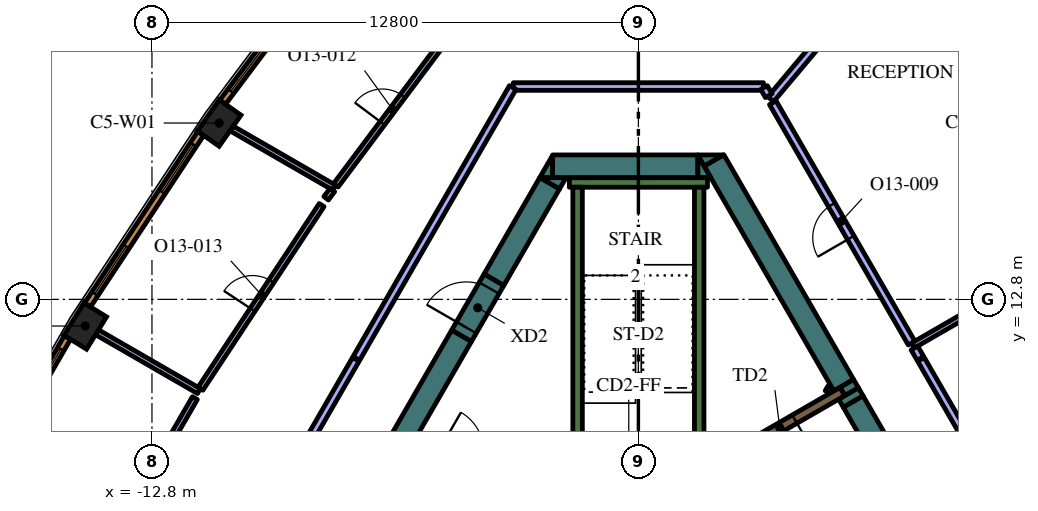
"""IFC4 building model, lengths in metres.
Left out: names, types, materials, properties, quantities, classifications, styles, units other than length and angle.
Written with IfcOpenShell. Run it as: python <this file> out.ifc"""

import sys

from ifc_helpers import new_model, si_unit, direction, frame, frame_2d, origin, origin_2d, place, context, subcontext, project, spatial, polyline, rectangle, outline, extrude, element, fill, save


model = new_model("IFC4")
c1 = context("Model", 3, precision=1e-05, world=origin(), true_north=direction((0.0, 1.0)))
c2 = subcontext(c1, "Body", "Model", "MODEL_VIEW")
j1 = project(units=[si_unit("LENGTHUNIT", "METRE"), si_unit("PLANEANGLEUNIT", "RADIAN")], contexts=[c1])
p1 = place(None, origin())
s1 = spatial("IfcSite", under=j1, at=p1, CompositionType="ELEMENT")
p2 = place(p1, origin())
s2 = spatial("IfcBuilding", under=s1, at=p2, CompositionType="ELEMENT")
p3 = place(p2, frame((0.0, 0.0, 300.6)))
s3 = spatial("IfcBuildingStorey", under=s2, at=p3, CompositionType="ELEMENT", Elevation=300.6)
for number, where, z_axis, x_axis in (
    (1, (-11.032, 17.44, 0.0), (0.0, 0.0, 1.0), (-0.575, -0.818, 0.0)),
    (2, (-14.556, 12.098, 0.0), (0.0, 0.0, 1.0), (-0.526, -0.851, 0.0)),
):
    element("IfcColumn", number, at=place(p3, frame(where, z_axis=z_axis, x_axis=x_axis)), inside=s3, PredefinedType="COLUMN", context=c2, shape_type="SweptSolid", body=[
        extrude(rectangle(XDim=1.0, YDim=0.7, at=origin_2d()), origin(), (0.0, 0.0, 1.0), 4.2),
    ])
p4 = place(p3, frame((5.529, 10.324, 0.0), z_axis=(0.0, 0.0, 1.0), x_axis=(0.499122205112, -0.866531606097, 0.0)))
e3 = element("IfcWall", 3, at=p4, inside=s3, PredefinedType="SOLIDWALL", context=c2, shape_type="SweptSolid", body=[
    extrude(rectangle(XDim=0.247, YDim=0.6, at=frame_2d((0.123, 0.0))), origin(), (0.0, 0.0, 1.0), 4.2),
])
p5 = place(p3, frame((1.989, 16.456, 0.0), z_axis=(0.0, 0.0, 1.0), x_axis=(0.499973159588, -0.866040899549, 0.0)))
e4 = element("IfcWall", 4, at=p5, inside=s3, PredefinedType="SOLIDWALL", context=c2, shape_type="SweptSolid", body=[
    extrude(rectangle(XDim=6.828, YDim=0.6, at=frame_2d((3.414, 0.0))), origin(), (0.0, 0.0, 1.0), 4.2),
])
p6 = place(p3, origin())
e5 = element("IfcWall", 5, at=p6, inside=s3, PredefinedType="SOLIDWALL", context=c2, shape_type="SweptSolid", body=[
    extrude(outline(polyline([(5.664, 10.691), (5.788, 10.476), (5.432, 10.271), (5.308, 10.486), (5.664, 10.691)])), origin(), (0.0, 0.0, 1.0), 4.2),
])
e6 = element("IfcWall", 6, at=p6, inside=s3, PredefinedType="SOLIDWALL", context=c2, shape_type="SweptSolid", body=[
    extrude(outline(polyline([(1.559, 16.6), (2.235, 16.6), (1.728, 16.307), (1.559, 16.6)])), origin(), (0.0, 0.0, 1.0), 4.2),
])
p7 = place(p3, frame((8.192, 5.711, 0.0), z_axis=(0.0, 0.0, 1.0), x_axis=(-0.500006836656, 0.866021456604, 0.0)))
e7 = element("IfcWall", 7, at=p7, inside=s3, PredefinedType="SOLIDWALL", context=c2, shape_type="SweptSolid", body=[
    extrude(rectangle(XDim=5.078, YDim=0.6, at=frame_2d((2.539, 0.0))), origin(), (0.0, 0.0, 1.0), 4.2),
])
p8 = place(p3, frame((-2.258, 16.3, 0.0), z_axis=(0.0, 0.0, 1.0), x_axis=(1.0, 0.0, 0.0)))
e8 = element("IfcWall", 8, at=p8, inside=s3, PredefinedType="SOLIDWALL", context=c2, shape_type="SweptSolid", body=[
    extrude(rectangle(XDim=3.823, YDim=0.6, at=frame_2d((1.912, 0.0))), origin(), (0.0, 0.0, 1.0), 4.2),
])
e9 = element("IfcWall", 9, at=p6, inside=s3, PredefinedType="SOLIDWALL", context=c2, shape_type="SweptSolid", body=[
    extrude(outline(polyline([(1.905, 16.0), (1.567, 16.0), (1.567, 16.585), (1.905, 16.0)])), origin(), (0.0, 0.0, 1.0), 4.2),
])
e10 = element("IfcWall", 10, at=p6, inside=s3, PredefinedType="SOLIDWALL", context=c2, shape_type="SweptSolid", body=[
    extrude(outline(polyline([(-2.598, 16.0), (-2.26, 16.585), (-2.26, 16.0), (-2.598, 16.0)])), origin(), (0.0, 0.0, 1.0), 4.2),
])
p9 = place(p3, frame((-2.335, 15.855, 0.0), z_axis=(0.0, 0.0, 1.0), x_axis=(-0.499960127962, -0.866048422692, 0.0)))
e11 = element("IfcWall", 11, at=p9, inside=s3, PredefinedType="SOLIDWALL", context=c2, shape_type="SweptSolid", body=[
    extrude(rectangle(XDim=2.934, YDim=0.6, at=frame_2d((1.467, 0.0))), origin(), (0.0, 0.0, 1.0), 4.2),
])
e12 = element("IfcWall", 12, at=p6, inside=s3, PredefinedType="SOLIDWALL", context=c2, shape_type="SweptSolid", body=[
    extrude(outline(polyline([(-1.905, 16.0), (-2.074, 15.707), (-2.581, 16.0), (-1.905, 16.0)])), origin(), (0.0, 0.0, 1.0), 4.2),
])
p10 = place(p3, frame((-12.582, -1.892, 0.0), z_axis=(0.0, 0.0, 1.0), x_axis=(0.500003640647, 0.866023301845, 0.0)))
e13 = element("IfcWall", 13, at=p10, inside=s3, PredefinedType="SOLIDWALL", context=c2, shape_type="SweptSolid", body=[
    extrude(rectangle(XDim=15.858, YDim=0.6, at=frame_2d((7.929, 0.0))), origin(), (0.0, 0.0, 1.0), 4.2),
])
p11 = place(p3, frame((-1.817, 15.875, 0.0), z_axis=(0.0, 0.0, 1.0), x_axis=(1.0, 0.0, 0.0)))
e14 = element("IfcWall", 14, at=p11, inside=s3, PredefinedType="SOLIDWALL", context=c2, shape_type="SweptSolid", body=[
    extrude(rectangle(XDim=3.634, YDim=0.25, at=frame_2d((1.817, 0.0))), origin(), (0.0, 0.0, 1.0), 4.2),
])
p12 = place(p3, frame((1.6, 8.95, 0.0), z_axis=(0.0, 0.0, 1.0), x_axis=(0.0, 1.0, 0.0)))
e15 = element("IfcWall", 15, at=p12, inside=s3, PredefinedType="SOLIDWALL", context=c2, shape_type="SweptSolid", body=[
    extrude(rectangle(XDim=6.8, YDim=0.25, at=frame_2d((3.4, 0.0))), origin(), (0.0, 0.0, 1.0), 4.2),
])
p13 = place(p3, frame((-1.6, 8.7, 0.0), z_axis=(0.0, 0.0, 1.0), x_axis=(0.0, 1.0, 0.0)))
e16 = element("IfcWall", 16, at=p13, inside=s3, PredefinedType="SOLIDWALL", context=c2, shape_type="SweptSolid", body=[
    extrude(rectangle(XDim=7.05, YDim=0.25, at=frame_2d((3.525, 0.0))), origin(), (0.0, 0.0, 1.0), 4.2),
])
p14 = place(p3, frame((4.98, 10.358, 0.0), z_axis=(0.0, 0.0, 1.0), x_axis=(0.500640202437, 0.86565546709, 0.0)))
e17 = element("IfcWall", 17, at=p14, inside=s3, PredefinedType="PARTITIONING", context=c2, shape_type="SweptSolid", body=[
    extrude(rectangle(XDim=0.146, YDim=0.15, at=frame_2d((0.073, 0.0))), origin(), (0.0, 0.0, 1.0), 3.55),
])
p15 = place(p3, frame((5.366, 10.373, 0.0), z_axis=(0.0, 0.0, 1.0), x_axis=(-0.866019956843, -0.50000943426, 0.0)))
e18 = element("IfcWall", 18, at=p15, inside=s3, PredefinedType="SOLIDWALL", context=c2, shape_type="SweptSolid", body=[
    extrude(rectangle(XDim=2.7, YDim=0.25, at=frame_2d((1.35, 0.0))), origin(), (0.0, 0.0, 1.0), 4.2),
])
p16 = place(p15, frame((1.45, 0.0, 0.0)))
e19 = element("IfcOpeningElement", 19, at=p16, cuts=e18, PredefinedType="OPENING", context=c2, shape_type="SweptSolid", body=[
    extrude(rectangle(XDim=0.9, YDim=2.1, at=frame_2d((0.45, 1.05))), frame((0.0, 0.135, 0.0), z_axis=(0.0, -1.0, 0.0), x_axis=(1.0, 0.0, 0.0)), (0.0, 0.0, 1.0), 0.27),
])
p17 = place(p3, frame((-4.652, 11.842, 0.0), z_axis=(0.0, 0.0, 1.0), x_axis=(0.500062241894, 0.865989465428, 0.0)))
e20 = element("IfcWall", 20, at=p17, inside=s3, PredefinedType="SOLIDWALL", context=c2, shape_type="SweptSolid", body=[
    extrude(rectangle(XDim=1.7, YDim=0.6, at=frame_2d((0.85, 0.0))), origin(), (0.0, 0.0, 1.0), 4.2),
])
p18 = place(p17, frame((0.25, 0.0, 0.0)))
e21 = element("IfcOpeningElement", 21, at=p18, cuts=e20, PredefinedType="OPENING", context=c2, shape_type="SweptSolid", body=[
    extrude(rectangle(XDim=1.2, YDim=2.1, at=frame_2d((0.6, 1.05))), frame((0.0, 0.31, 0.0), z_axis=(0.0, -1.0, 0.0), x_axis=(1.0, 0.0, 0.0)), (0.0, 0.0, 1.0), 0.62),
])
p19 = place(p3, frame((7.226, 11.585, 0.0), z_axis=(0.0, 0.0, 1.0), x_axis=(0.866021079084, 0.500007490527, 0.0)))
e22 = element("IfcWall", 22, at=p19, inside=s3, PredefinedType="PARTITIONING", context=c2, shape_type="SweptSolid", body=[
    extrude(rectangle(XDim=2.892, YDim=0.15, at=frame_2d((1.446, 0.0))), origin(), (0.0, 0.0, 1.0), 3.55),
])
p20 = place(p3, frame((13.436, 0.829, 0.0), z_axis=(0.0, 0.0, 1.0), x_axis=(-0.49999894854, 0.866026010844, 0.0)))
e23 = element("IfcWall", 23, at=p20, inside=s3, PredefinedType="PARTITIONING", context=c2, shape_type="SweptSolid", body=[
    extrude(rectangle(XDim=12.0, YDim=0.2, at=frame_2d((6.0, 0.0))), origin(), (0.0, 0.0, 1.0), 3.55),
])
p21 = place(p20, frame((5.5, 0.0, 0.0)))
e24 = element("IfcOpeningElement", 24, at=p21, cuts=e23, PredefinedType="OPENING", context=c2, shape_type="SweptSolid", body=[
    extrude(rectangle(XDim=1.0, YDim=2.1, at=frame_2d((0.5, 1.05))), frame((0.0, 0.11, 0.0), z_axis=(0.0, -1.0, 0.0), x_axis=(1.0, 0.0, 0.0)), (0.0, 0.0, 1.0), 0.22),
])
p22 = place(p3, frame((7.421, 11.247, 0.0), z_axis=(0.0, 0.0, 1.0), x_axis=(-0.500303403544, 0.865850162789, 0.0)))
e25 = element("IfcWall", 25, at=p22, inside=s3, PredefinedType="PARTITIONING", context=c2, shape_type="SweptSolid", body=[
    extrude(rectangle(XDim=0.315, YDim=0.2, at=frame_2d((0.158, 0.0))), origin(), (0.0, 0.0, 1.0), 3.55),
])
p23 = place(p3, frame((3.483, 18.067, 0.0), z_axis=(0.0, 0.0, 1.0), x_axis=(0.642896944312, 0.765952687177, 0.0)))
e26 = element("IfcWall", 26, at=p23, inside=s3, PredefinedType="PARTITIONING", context=c2, shape_type="SweptSolid", body=[
    extrude(rectangle(XDim=2.29, YDim=0.2, at=frame_2d((1.145, 0.0))), origin(), (0.0, 0.0, 1.0), 3.55),
])
p24 = place(p3, frame((7.188, 11.65, 0.0), z_axis=(0.0, 0.0, 1.0), x_axis=(-0.499989634868, 0.866031388014, 0.0)))
e27 = element("IfcWall", 27, at=p24, inside=s3, PredefinedType="PARTITIONING", context=c2, shape_type="SweptSolid", body=[
    extrude(rectangle(XDim=7.303, YDim=0.2, at=frame_2d((3.652, 0.0))), origin(), (0.0, 0.0, 1.0), 3.55),
])
p25 = place(p24, frame((3.2, 0.0, 0.0)))
e28 = element("IfcOpeningElement", 28, at=p25, cuts=e27, PredefinedType="OPENING", context=c2, shape_type="SweptSolid", body=[
    extrude(rectangle(XDim=1.0, YDim=2.1, at=frame_2d((0.5, 1.05))), frame((0.0, 0.11, 0.0), z_axis=(0.0, -1.0, 0.0), x_axis=(1.0, 0.0, 0.0)), (0.0, 0.0, 1.0), 0.22),
])
p26 = place(p3, frame((-8.007, 15.74, 0.0), z_axis=(0.0, 0.0, 1.0), x_axis=(-0.866044607523, 0.499966736674, 0.0)))
e29 = element("IfcWall", 29, at=p26, inside=s3, PredefinedType="PARTITIONING", context=c2, shape_type="SweptSolid", body=[
    extrude(rectangle(XDim=3.115, YDim=0.15, at=frame_2d((1.557, 0.0))), origin(), (0.0, 0.0, 1.0), 3.55),
])
p27 = place(p3, frame((-7.962, 15.8, 0.0), z_axis=(0.0, 0.0, 1.0), x_axis=(0.599541489613, 0.800343677574, 0.0)))
e30 = element("IfcWall", 30, at=p27, inside=s3, PredefinedType="PARTITIONING", context=c2, shape_type="SweptSolid", body=[
    extrude(rectangle(XDim=4.942, YDim=0.15, at=frame_2d((2.471, 0.0))), origin(), (0.0, 0.0, 1.0), 3.55),
])
p28 = place(p27, frame((2.042, 0.0, 0.0)))
e31 = element("IfcOpeningElement", 31, at=p28, cuts=e30, PredefinedType="OPENING", context=c2, shape_type="SweptSolid", body=[
    extrude(rectangle(XDim=0.9, YDim=2.1, at=frame_2d((0.45, 1.05))), frame((0.0, 0.085, 0.0), z_axis=(0.0, -1.0, 0.0), x_axis=(1.0, 0.0, 0.0)), (0.0, 0.0, 1.0), 0.17),
])
p29 = place(p3, frame((-11.564, 10.387, 0.0), z_axis=(0.0, 0.0, 1.0), x_axis=(-0.86604641216, 0.499963610661, 0.0)))
e32 = element("IfcWall", 32, at=p29, inside=s3, PredefinedType="PARTITIONING", context=c2, shape_type="SweptSolid", body=[
    extrude(rectangle(XDim=3.096, YDim=0.15, at=frame_2d((1.548, 0.0))), origin(), (0.0, 0.0, 1.0), 3.55),
])
p30 = place(p3, frame((-8.052, 15.679, 0.0), z_axis=(0.0, 0.0, 1.0), x_axis=(-0.599004157744, -0.800745914136, 0.0)))
e33 = element("IfcWall", 33, at=p30, inside=s3, PredefinedType="PARTITIONING", context=c2, shape_type="SweptSolid", body=[
    extrude(rectangle(XDim=0.275, YDim=0.15, at=frame_2d((0.137, 0.0))), origin(), (0.0, 0.0, 1.0), 3.55),
])
p31 = place(p3, frame((-11.523, 10.449, 0.0), z_axis=(0.0, 0.0, 1.0), x_axis=(0.550751709023, 0.834669129061, 0.0)))
e34 = element("IfcWall", 34, at=p31, inside=s3, PredefinedType="PARTITIONING", context=c2, shape_type="SweptSolid", body=[
    extrude(rectangle(XDim=5.788, YDim=0.15, at=frame_2d((2.894, 0.0))), origin(), (0.0, 0.0, 1.0), 3.55),
])
p32 = place(p31, frame((2.488, 0.0, 0.0)))
e35 = element("IfcOpeningElement", 35, at=p32, cuts=e34, PredefinedType="OPENING", context=c2, shape_type="SweptSolid", body=[
    extrude(rectangle(XDim=0.9, YDim=2.1, at=frame_2d((0.45, 1.05))), frame((0.0, 0.085, 0.0), z_axis=(0.0, -1.0, 0.0), x_axis=(1.0, 0.0, 0.0)), (0.0, 0.0, 1.0), 0.17),
])
p33 = place(p3, frame((-14.74, 4.887, 0.0), z_axis=(0.0, 0.0, 1.0), x_axis=(0.500007141444, 0.86602128063, 0.0)))
e36 = element("IfcWall", 36, at=p33, inside=s3, PredefinedType="PARTITIONING", context=c2, shape_type="SweptSolid", body=[
    extrude(rectangle(XDim=6.137, YDim=0.15, at=frame_2d((3.068, 0.0))), origin(), (0.0, 0.0, 1.0), 3.55),
])
p34 = place(p33, frame((2.637, 0.0, 0.0)))
e37 = element("IfcOpeningElement", 37, at=p34, cuts=e36, PredefinedType="OPENING", context=c2, shape_type="SweptSolid", body=[
    extrude(rectangle(XDim=0.9, YDim=2.1, at=frame_2d((0.45, 1.05))), frame((0.0, 0.085, 0.0), z_axis=(0.0, -1.0, 0.0), x_axis=(1.0, 0.0, 0.0)), (0.0, 0.0, 1.0), 0.17),
])
p35 = place(p3, frame((-7.436, 11.221, 0.0), z_axis=(0.0, 0.0, 1.0), x_axis=(-0.49999894854, -0.866026010844, 0.0)))
e38 = element("IfcWall", 38, at=p35, inside=s3, PredefinedType="PARTITIONING", context=c2, shape_type="SweptSolid", body=[
    extrude(rectangle(XDim=12.0, YDim=0.2, at=frame_2d((6.0, 0.0))), origin(), (0.0, 0.0, 1.0), 3.55),
])
p36 = place(p35, frame((5.5, 0.0, 0.0)))
e39 = element("IfcOpeningElement", 39, at=p36, cuts=e38, PredefinedType="OPENING", context=c2, shape_type="SweptSolid", body=[
    extrude(rectangle(XDim=1.0, YDim=2.1, at=frame_2d((0.5, 1.05))), frame((0.0, 0.11, 0.0), z_axis=(0.0, -1.0, 0.0), x_axis=(1.0, 0.0, 0.0)), (0.0, 0.0, 1.0), 0.22),
])
p37 = place(p3, frame((3.291, 18.4, 0.0), z_axis=(0.0, 0.0, 1.0), x_axis=(-1.0, 0.0, 0.0)))
e40 = element("IfcWall", 40, at=p37, inside=s3, PredefinedType="PARTITIONING", context=c2, shape_type="SweptSolid", body=[
    extrude(rectangle(XDim=6.582, YDim=0.2, at=frame_2d((3.291, 0.0))), origin(), (0.0, 0.0, 1.0), 3.55),
])
p38 = place(p3, frame((-3.306, 18.374, 0.0), z_axis=(0.0, 0.0, 1.0), x_axis=(-0.499999798456, -0.866025520146, 0.0)))
e41 = element("IfcWall", 41, at=p38, inside=s3, PredefinedType="PARTITIONING", context=c2, shape_type="SweptSolid", body=[
    extrude(rectangle(XDim=8.229, YDim=0.2, at=frame_2d((4.115, 0.0))), origin(), (0.0, 0.0, 1.0), 3.55),
])
p39 = place(p3, frame((3.43, 18.159, 0.0), z_axis=(0.0, 0.0, 1.0), x_axis=(-0.499949632511, 0.866054481515, 0.0)))
e42 = element("IfcWall", 42, at=p39, inside=s3, PredefinedType="PARTITIONING", context=c2, shape_type="SweptSolid", body=[
    extrude(rectangle(XDim=0.248, YDim=0.2, at=frame_2d((0.124, 0.0))), origin(), (0.0, 0.0, 1.0), 3.55),
])
p40 = place(p3, frame((10.938, 17.99, 0.0), z_axis=(0.0, 0.0, 1.0), x_axis=(-0.599559865294, 0.800329911929, 0.0)))
e43 = element("IfcWall", 43, at=p40, inside=s3, PredefinedType="SOLIDWALL", context=c2, shape_type="SweptSolid", body=[
    extrude(rectangle(XDim=5.415, YDim=0.19, at=frame_2d((2.708, 0.0))), origin(), (0.0, 0.0, 1.0), 3.95),
])
p41 = place(p40, frame((0.358, 0.0, 0.6)))
e44 = element("IfcOpeningElement", 44, at=p41, cuts=e43, PredefinedType="OPENING", context=c2, shape_type="SweptSolid", body=[
    extrude(rectangle(XDim=1.5, YDim=2.85, at=frame_2d((0.75, 1.425))), frame((0.0, 0.105, 0.0), z_axis=(0.0, -1.0, 0.0), x_axis=(1.0, 0.0, 0.0)), (0.0, 0.0, 1.0), 0.21),
])
p42 = place(p40, frame((3.593, 0.0, 0.6)))
e45 = element("IfcOpeningElement", 45, at=p42, cuts=e43, PredefinedType="OPENING", context=c2, shape_type="SweptSolid", body=[
    extrude(rectangle(XDim=1.5, YDim=2.85, at=frame_2d((0.75, 1.425))), frame((0.0, 0.105, 0.0), z_axis=(0.0, -1.0, 0.0), x_axis=(1.0, 0.0, 0.0)), (0.0, 0.0, 1.0), 0.21),
])
p43 = place(p3, frame((-7.692, 22.324, 0.0), z_axis=(0.0, 0.0, 1.0), x_axis=(-0.599559865294, -0.800329911929, 0.0)))
e46 = element("IfcWall", 46, at=p43, inside=s3, PredefinedType="SOLIDWALL", context=c2, shape_type="SweptSolid", body=[
    extrude(rectangle(XDim=5.415, YDim=0.19, at=frame_2d((2.708, 0.0))), origin(), (0.0, 0.0, 1.0), 3.95),
])
p44 = place(p43, frame((0.323, 0.0, 0.6)))
e47 = element("IfcOpeningElement", 47, at=p44, cuts=e46, PredefinedType="OPENING", context=c2, shape_type="SweptSolid", body=[
    extrude(rectangle(XDim=1.5, YDim=2.85, at=frame_2d((0.75, 1.425))), frame((0.0, 0.105, 0.0), z_axis=(0.0, -1.0, 0.0), x_axis=(1.0, 0.0, 0.0)), (0.0, 0.0, 1.0), 0.21),
])
p45 = place(p43, frame((3.558, 0.0, 0.6)))
e48 = element("IfcOpeningElement", 48, at=p45, cuts=e46, PredefinedType="OPENING", context=c2, shape_type="SweptSolid", body=[
    extrude(rectangle(XDim=1.5, YDim=2.85, at=frame_2d((0.75, 1.425))), frame((0.0, 0.105, 0.0), z_axis=(0.0, -1.0, 0.0), x_axis=(1.0, 0.0, 0.0)), (0.0, 0.0, 1.0), 0.21),
])
p46 = place(p3, frame((-11.518, 17.166, 0.0), z_axis=(0.0, 0.0, 1.0), x_axis=(-0.550744054781, -0.83467417962, 0.0)))
e49 = element("IfcWall", 49, at=p46, inside=s3, PredefinedType="SOLIDWALL", context=c2, shape_type="SweptSolid", body=[
    extrude(rectangle(XDim=5.406, YDim=0.19, at=frame_2d((2.703, 0.0))), origin(), (0.0, 0.0, 1.0), 3.95),
])
p47 = place(p46, frame((0.346, 0.0, 0.6)))
e50 = element("IfcOpeningElement", 50, at=p47, cuts=e49, PredefinedType="OPENING", context=c2, shape_type="SweptSolid", body=[
    extrude(rectangle(XDim=1.5, YDim=2.85, at=frame_2d((0.75, 1.425))), frame((0.0, 0.105, 0.0), z_axis=(0.0, -1.0, 0.0), x_axis=(1.0, 0.0, 0.0)), (0.0, 0.0, 1.0), 0.21),
])
p48 = place(p46, frame((3.559, 0.0, 0.6)))
e51 = element("IfcOpeningElement", 51, at=p48, cuts=e49, PredefinedType="OPENING", context=c2, shape_type="SweptSolid", body=[
    extrude(rectangle(XDim=1.5, YDim=2.85, at=frame_2d((0.75, 1.425))), frame((0.0, 0.105, 0.0), z_axis=(0.0, -1.0, 0.0), x_axis=(1.0, 0.0, 0.0)), (0.0, 0.0, 1.0), 0.21),
])
p49 = place(p3, frame((-15.025, 11.796, 0.0), z_axis=(0.0, 0.0, 1.0), x_axis=(-0.500024767483, -0.866011103799, 0.0)))
e52 = element("IfcWall", 52, at=p49, inside=s3, PredefinedType="SOLIDWALL", context=c2, shape_type="SweptSolid", body=[
    extrude(rectangle(XDim=5.406, YDim=0.19, at=frame_2d((2.703, 0.0))), origin(), (0.0, 0.0, 1.0), 3.95),
])
p50 = place(p49, frame((0.346, 0.0, 0.6)))
e53 = element("IfcOpeningElement", 53, at=p50, cuts=e52, PredefinedType="OPENING", context=c2, shape_type="SweptSolid", body=[
    extrude(rectangle(XDim=1.5, YDim=2.85, at=frame_2d((0.75, 1.425))), frame((0.0, 0.105, 0.0), z_axis=(0.0, -1.0, 0.0), x_axis=(1.0, 0.0, 0.0)), (0.0, 0.0, 1.0), 0.21),
])
p51 = place(p49, frame((3.559, 0.0, 0.6)))
e54 = element("IfcOpeningElement", 54, at=p51, cuts=e52, PredefinedType="OPENING", context=c2, shape_type="SweptSolid", body=[
    extrude(rectangle(XDim=1.5, YDim=2.85, at=frame_2d((0.75, 1.425))), frame((0.0, 0.105, 0.0), z_axis=(0.0, -1.0, 0.0), x_axis=(1.0, 0.0, 0.0)), (0.0, 0.0, 1.0), 0.21),
])
p52 = place(p16, origin())
e55 = element("IfcDoor", 55, at=p52, inside=s3, OperationType="SINGLE_SWING_LEFT", PredefinedType="DOOR", context=c2, shape_type="SweptSolid", body=[
    extrude(rectangle(XDim=0.9, YDim=2.1, at=frame_2d((0.45, 1.05))), frame((0.0, 0.025, 0.0), z_axis=(0.0, -1.0, 0.0), x_axis=(1.0, 0.0, 0.0)), (0.0, 0.0, 1.0), 0.05),
])
fill(e19, e55)
p53 = place(p18, origin())
e56 = element("IfcDoor", 56, at=p53, inside=s3, OperationType="SINGLE_SWING_LEFT", PredefinedType="DOOR", context=c2, shape_type="SweptSolid", body=[
    extrude(rectangle(XDim=1.2, YDim=2.1, at=frame_2d((0.6, 1.05))), frame((0.0, 0.025, 0.0), z_axis=(0.0, -1.0, 0.0), x_axis=(1.0, 0.0, 0.0)), (0.0, 0.0, 1.0), 0.05),
])
fill(e21, e56)
p54 = place(p25, origin())
e57 = element("IfcDoor", 57, at=p54, inside=s3, OperationType="SINGLE_SWING_RIGHT", PredefinedType="DOOR", context=c2, shape_type="SweptSolid", body=[
    extrude(rectangle(XDim=1.0, YDim=2.1, at=frame_2d((0.5, 1.05))), frame((0.0, 0.025, 0.0), z_axis=(0.0, -1.0, 0.0), x_axis=(1.0, 0.0, 0.0)), (0.0, 0.0, 1.0), 0.05),
])
fill(e28, e57)
p55 = place(p28, origin())
e58 = element("IfcDoor", 58, at=p55, inside=s3, OperationType="SINGLE_SWING_RIGHT", PredefinedType="DOOR", context=c2, shape_type="SweptSolid", body=[
    extrude(rectangle(XDim=0.9, YDim=2.1, at=frame_2d((0.45, 1.05))), frame((0.0, 0.025, 0.0), z_axis=(0.0, -1.0, 0.0), x_axis=(1.0, 0.0, 0.0)), (0.0, 0.0, 1.0), 0.05),
])
fill(e31, e58)
p56 = place(p32, origin())
e59 = element("IfcDoor", 59, at=p56, inside=s3, OperationType="SINGLE_SWING_RIGHT", PredefinedType="DOOR", context=c2, shape_type="SweptSolid", body=[
    extrude(rectangle(XDim=0.9, YDim=2.1, at=frame_2d((0.45, 1.05))), frame((0.0, 0.025, 0.0), z_axis=(0.0, -1.0, 0.0), x_axis=(1.0, 0.0, 0.0)), (0.0, 0.0, 1.0), 0.05),
])
fill(e35, e59)
p57 = place(p45, origin())
e60 = element("IfcWindow", 60, at=p57, inside=s3, PartitioningType="SINGLE_PANEL", PredefinedType="WINDOW", context=c2, shape_type="SweptSolid", body=[
    extrude(rectangle(XDim=1.5, YDim=2.85, at=frame_2d((0.75, 1.425))), frame((0.0, 0.045, 0.0), z_axis=(0.0, -1.0, 0.0), x_axis=(1.0, 0.0, 0.0)), (0.0, 0.0, 1.0), 0.06),
])
fill(e48, e60)
p58 = place(p47, origin())
e61 = element("IfcWindow", 61, at=p58, inside=s3, PartitioningType="SINGLE_PANEL", PredefinedType="WINDOW", context=c2, shape_type="SweptSolid", body=[
    extrude(rectangle(XDim=1.5, YDim=2.85, at=frame_2d((0.75, 1.425))), frame((0.0, 0.045, 0.0), z_axis=(0.0, -1.0, 0.0), x_axis=(1.0, 0.0, 0.0)), (0.0, 0.0, 1.0), 0.06),
])
fill(e50, e61)
p59 = place(p48, origin())
e62 = element("IfcWindow", 62, at=p59, inside=s3, PartitioningType="SINGLE_PANEL", PredefinedType="WINDOW", context=c2, shape_type="SweptSolid", body=[
    extrude(rectangle(XDim=1.5, YDim=2.85, at=frame_2d((0.75, 1.425))), frame((0.0, 0.045, 0.0), z_axis=(0.0, -1.0, 0.0), x_axis=(1.0, 0.0, 0.0)), (0.0, 0.0, 1.0), 0.06),
])
fill(e51, e62)
p60 = place(p50, origin())
e63 = element("IfcWindow", 63, at=p60, inside=s3, PartitioningType="SINGLE_PANEL", PredefinedType="WINDOW", context=c2, shape_type="SweptSolid", body=[
    extrude(rectangle(XDim=1.5, YDim=2.85, at=frame_2d((0.75, 1.425))), frame((0.0, 0.045, 0.0), z_axis=(0.0, -1.0, 0.0), x_axis=(1.0, 0.0, 0.0)), (0.0, 0.0, 1.0), 0.06),
])
fill(e53, e63)
save(model, sys.argv[1])
